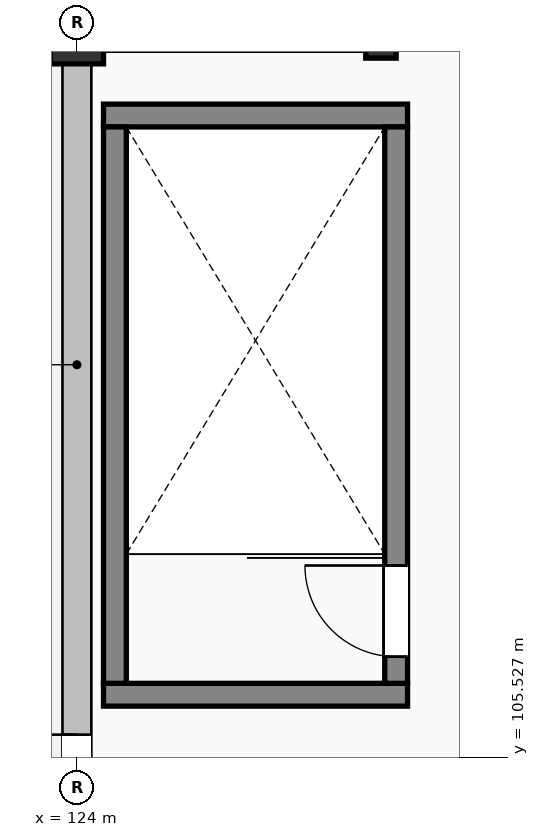
"""IFC4 building model, lengths in metres.
Left out: names, types, materials, properties, quantities, classifications, styles, units other than length and angle.
Written with IfcOpenShell. Run it as: python <this file> out.ifc"""

import sys

from ifc_helpers import new_model, si_unit, direction, frame, frame_2d, origin, origin_2d, place, context, subcontext, project, spatial, rectangle, extrude, element, fill, save


model = new_model("IFC4")
c1 = context("Model", 3, precision=1e-05, world=origin(), true_north=direction((0.0, 1.0)))
c2 = subcontext(c1, "Body", "Model", "MODEL_VIEW")
j1 = project(units=[si_unit("LENGTHUNIT", "METRE"), si_unit("PLANEANGLEUNIT", "RADIAN")], contexts=[c1])
p1 = place(None, origin())
s1 = spatial("IfcSite", under=j1, at=p1, CompositionType="ELEMENT")
p2 = place(p1, origin())
s2 = spatial("IfcBuilding", under=s1, at=p2, CompositionType="ELEMENT")
p3 = place(p2, frame((0.0, 0.0, 13.8)))
s3 = spatial("IfcBuildingStorey", under=s2, at=p3, CompositionType="ELEMENT", Elevation=13.8)
p4 = place(p3, frame((124.0, 115.0, 0.0), z_axis=(0.0, 0.0, 1.0), x_axis=(1.0, 0.0, 0.0)))
e1 = element("IfcColumn", 1, at=p4, inside=s3, PredefinedType="COLUMN", context=c2, shape_type="SweptSolid", body=[
    extrude(rectangle(XDim=0.7, YDim=0.7, at=origin_2d()), origin(), (0.0, 0.0, 1.0), 4.5),
])
p5 = place(p3, frame((128.0, 115.0, 0.0), z_axis=(0.0, 0.0, 1.0), x_axis=(1.0, 0.0, 0.0)))
e2 = element("IfcColumn", 2, at=p5, inside=s3, PredefinedType="PILASTER", context=c2, shape_type="SweptSolid", body=[
    extrude(rectangle(XDim=0.4, YDim=0.55, at=origin_2d()), origin(), (0.0, 0.0, 1.0), 4.5),
])
p6 = place(p3, frame((124.0, 95.35, 0.0), z_axis=(0.0, 0.0, 1.0), x_axis=(0.0, 1.0, 0.0)))
e3 = element("IfcWall", 3, at=p6, inside=s3, PredefinedType="SOLIDWALL", context=c2, shape_type="SweptSolid", body=[
    extrude(rectangle(XDim=19.3, YDim=0.38, at=frame_2d((9.65, 0.0))), origin(), (0.0, 0.0, 1.0), 4.27),
])
p7 = place(p6, frame((8.825, 0.0, 0.0)))
e4 = element("IfcOpeningElement", 4, at=p7, cuts=e3, PredefinedType="OPENING", context=c2, shape_type="SweptSolid", body=[
    extrude(rectangle(XDim=1.65, YDim=2.25, at=frame_2d((0.825, 1.125))), frame((0.0, 0.2, 0.0), z_axis=(0.0, -1.0, 0.0), x_axis=(1.0, 0.0, 0.0)), (0.0, 0.0, 1.0), 0.4),
])
for number, where, z_axis, x_axis in (
    (5, (124.35, 106.35, 0.0), (0.0, 0.0, 1.0), (1.0, 0.0, 0.0)),
    (6, (128.35, 113.97, 0.0), (0.0, 0.0, 1.0), (-1.0, 0.0, 0.0)),
):
    element("IfcWall", number, at=place(p3, frame(where, z_axis=z_axis, x_axis=x_axis)), inside=s3, PredefinedType="SHEAR", context=c2, shape_type="SweptSolid", body=[
        extrude(rectangle(XDim=4.0, YDim=0.3, at=frame_2d((2.0, 0.0))), origin(), (0.0, 0.0, 1.0), 4.27),
    ])
p8 = place(p3, frame((124.5, 106.5, 0.0), z_axis=(0.0, 0.0, 1.0), x_axis=(0.0, 1.0, 0.0)))
e7 = element("IfcWall", 7, at=p8, inside=s3, PredefinedType="SHEAR", context=c2, shape_type="SweptSolid", body=[
    extrude(rectangle(XDim=7.32, YDim=0.3, at=frame_2d((3.66, 0.0))), origin(), (0.0, 0.0, 1.0), 4.27),
])
p9 = place(p3, frame((128.2, 106.5, 0.0), z_axis=(0.0, 0.0, 1.0), x_axis=(0.0, 1.0, 0.0)))
e8 = element("IfcWall", 8, at=p9, inside=s3, PredefinedType="SHEAR", context=c2, shape_type="SweptSolid", body=[
    extrude(rectangle(XDim=7.32, YDim=0.3, at=frame_2d((3.66, 0.0))), origin(), (0.0, 0.0, 1.0), 4.27),
])
p10 = place(p9, frame((0.35, 0.0, 0.0)))
e9 = element("IfcOpeningElement", 9, at=p10, cuts=e8, PredefinedType="OPENING", context=c2, shape_type="SweptSolid", body=[
    extrude(rectangle(XDim=1.2, YDim=2.15, at=frame_2d((0.6, 1.075))), frame((0.0, 0.16, 0.0), z_axis=(0.0, -1.0, 0.0), x_axis=(1.0, 0.0, 0.0)), (0.0, 0.0, 1.0), 0.32),
])
p11 = place(p7, origin())
e10 = element("IfcDoor", 10, at=p11, inside=s3, OperationType="DOUBLE_DOOR_SINGLE_SWING", PredefinedType="DOOR", context=c2, shape_type="SweptSolid", body=[
    extrude(rectangle(XDim=1.65, YDim=2.25, at=frame_2d((0.825, 1.125))), frame((0.0, 0.025, 0.0), z_axis=(0.0, -1.0, 0.0), x_axis=(1.0, 0.0, 0.0)), (0.0, 0.0, 1.0), 0.05),
])
fill(e4, e10)
p12 = place(p10, origin())
e11 = element("IfcDoor", 11, at=p12, inside=s3, OperationType="SINGLE_SWING_RIGHT", PredefinedType="DOOR", context=c2, shape_type="SweptSolid", body=[
    extrude(rectangle(XDim=1.2, YDim=2.15, at=frame_2d((0.6, 1.075))), frame((0.0, 0.025, 0.0), z_axis=(0.0, -1.0, 0.0), x_axis=(1.0, 0.0, 0.0)), (0.0, 0.0, 1.0), 0.05),
])
fill(e9, e11)
save(model, sys.argv[1])
